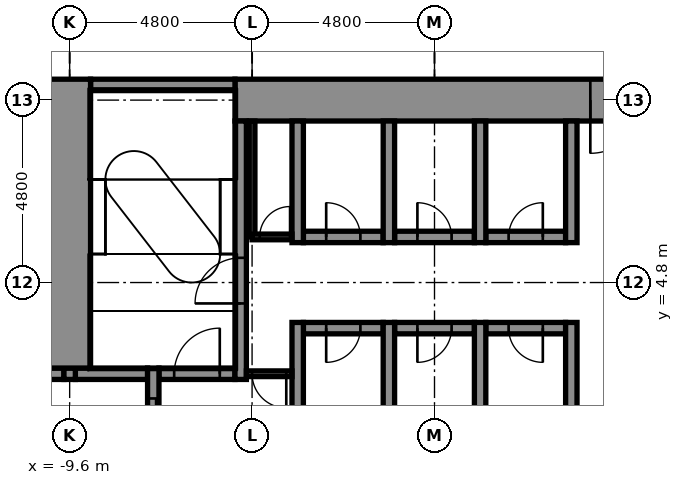
"""IFC4 building model, lengths in metres.
Left out: names, types, materials, properties, quantities, classifications, styles, units other than length and angle.
Written with IfcOpenShell. Run it as: python <this file> out.ifc"""

import sys

from ifc_helpers import new_model, si_unit, direction, frame, frame_2d, origin, place, context, subcontext, project, spatial, rectangle, extrude, element, fill, save


model = new_model("IFC4")
c1 = context("Model", 3, precision=1e-05, world=origin(), true_north=direction((0.0, 1.0)))
c2 = subcontext(c1, "Body", "Model", "MODEL_VIEW")
j1 = project(units=[si_unit("LENGTHUNIT", "METRE"), si_unit("PLANEANGLEUNIT", "RADIAN")], contexts=[c1])
p1 = place(None, origin())
s1 = spatial("IfcSite", under=j1, at=p1, CompositionType="ELEMENT")
p2 = place(p1, origin())
s2 = spatial("IfcBuilding", under=s1, at=p2, CompositionType="ELEMENT")
p3 = place(p2, frame((0.0, 0.0, 66.4)))
s3 = spatial("IfcBuildingStorey", under=s2, at=p3, CompositionType="ELEMENT", Elevation=66.4)
p4 = place(p3, frame((-10.85, 2.4, -0.3), z_axis=(0.0, 0.0, 1.0), x_axis=(1.0, 0.0, 0.0)))
e1 = element("IfcWall", 1, at=p4, inside=s3, PredefinedType="STANDARD", context=c2, shape_type="SweptSolid", body=[
    extrude(rectangle(XDim=1.1, YDim=0.3, at=frame_2d((0.55, 0.0))), origin(), (0.0, 0.0, 1.0), 5.5),
])
p5 = place(p3, frame((-9.45, 2.4, -0.3), z_axis=(0.0, 0.0, 1.0), x_axis=(1.0, 0.0, 0.0)))
e2 = element("IfcWall", 2, at=p5, inside=s3, PredefinedType="STANDARD", context=c2, shape_type="SweptSolid", body=[
    extrude(rectangle(XDim=1.9, YDim=0.3, at=frame_2d((0.95, 0.0))), origin(), (0.0, 0.0, 1.0), 5.5),
])
p6 = place(p3, frame((-7.25, 2.4, -0.3), z_axis=(0.0, 0.0, 1.0), x_axis=(1.0, 0.0, 0.0)))
e3 = element("IfcWall", 3, at=p6, inside=s3, PredefinedType="STANDARD", context=c2, shape_type="SweptSolid", body=[
    extrude(rectangle(XDim=2.0, YDim=0.3, at=frame_2d((1.0, 0.0))), origin(), (0.0, 0.0, 1.0), 5.5),
])
p7 = place(p6, frame((0.4, 0.0, 0.3)))
e4 = element("IfcOpeningElement", 4, at=p7, cuts=e3, PredefinedType="OPENING", context=c2, shape_type="SweptSolid", body=[
    extrude(rectangle(XDim=1.2, YDim=2.1, at=frame_2d((0.6, 1.05))), frame((0.0, 0.16, 0.0), z_axis=(0.0, -1.0, 0.0), x_axis=(1.0, 0.0, 0.0)), (0.0, 0.0, 1.0), 0.32),
])
p8 = place(p3, frame((-3.45, 3.6, -0.3), z_axis=(0.0, 0.0, 1.0), x_axis=(1.0, 0.0, 0.0)))
e5 = element("IfcWall", 5, at=p8, inside=s3, PredefinedType="STANDARD", context=c2, shape_type="SweptSolid", body=[
    extrude(rectangle(XDim=2.1, YDim=0.3, at=frame_2d((1.05, 0.0))), origin(), (0.0, 0.0, 1.0), 5.5),
])
p9 = place(p8, frame((0.6, 0.0, 0.3)))
e6 = element("IfcOpeningElement", 6, at=p9, cuts=e5, PredefinedType="OPENING", context=c2, shape_type="SweptSolid", body=[
    extrude(rectangle(XDim=0.9, YDim=2.1, at=frame_2d((0.45, 1.05))), frame((0.0, 0.16, 0.0), z_axis=(0.0, -1.0, 0.0), x_axis=(1.0, 0.0, 0.0)), (0.0, 0.0, 1.0), 0.32),
])
p10 = place(p3, frame((-1.05, 3.6, -0.3), z_axis=(0.0, 0.0, 1.0), x_axis=(1.0, 0.0, 0.0)))
e7 = element("IfcWall", 7, at=p10, inside=s3, PredefinedType="STANDARD", context=c2, shape_type="SweptSolid", body=[
    extrude(rectangle(XDim=2.1, YDim=0.3, at=frame_2d((1.05, 0.0))), origin(), (0.0, 0.0, 1.0), 5.5),
])
p11 = place(p10, frame((0.6, 0.0, 0.3)))
e8 = element("IfcOpeningElement", 8, at=p11, cuts=e7, PredefinedType="OPENING", context=c2, shape_type="SweptSolid", body=[
    extrude(rectangle(XDim=0.9, YDim=2.1, at=frame_2d((0.45, 1.05))), frame((0.0, 0.16, 0.0), z_axis=(0.0, -1.0, 0.0), x_axis=(1.0, 0.0, 0.0)), (0.0, 0.0, 1.0), 0.32),
])
p12 = place(p3, frame((1.35, 3.6, -0.3), z_axis=(0.0, 0.0, 1.0), x_axis=(1.0, 0.0, 0.0)))
e9 = element("IfcWall", 9, at=p12, inside=s3, PredefinedType="STANDARD", context=c2, shape_type="SweptSolid", body=[
    extrude(rectangle(XDim=2.1, YDim=0.3, at=frame_2d((1.05, 0.0))), origin(), (0.0, 0.0, 1.0), 5.5),
])
p13 = place(p12, frame((0.6, 0.0, 0.3)))
e10 = element("IfcOpeningElement", 10, at=p13, cuts=e9, PredefinedType="OPENING", context=c2, shape_type="SweptSolid", body=[
    extrude(rectangle(XDim=0.9, YDim=2.1, at=frame_2d((0.45, 1.05))), frame((0.0, 0.16, 0.0), z_axis=(0.0, -1.0, 0.0), x_axis=(1.0, 0.0, 0.0)), (0.0, 0.0, 1.0), 0.32),
])
p14 = place(p3, frame((-3.45, 6.0, -0.3), z_axis=(0.0, 0.0, 1.0), x_axis=(1.0, 0.0, 0.0)))
e11 = element("IfcWall", 11, at=p14, inside=s3, PredefinedType="STANDARD", context=c2, shape_type="SweptSolid", body=[
    extrude(rectangle(XDim=2.1, YDim=0.3, at=frame_2d((1.05, 0.0))), origin(), (0.0, 0.0, 1.0), 5.5),
])
p15 = place(p14, frame((0.6, 0.0, 0.3)))
e12 = element("IfcOpeningElement", 12, at=p15, cuts=e11, PredefinedType="OPENING", context=c2, shape_type="SweptSolid", body=[
    extrude(rectangle(XDim=0.9, YDim=2.1, at=frame_2d((0.45, 1.05))), frame((0.0, 0.16, 0.0), z_axis=(0.0, -1.0, 0.0), x_axis=(1.0, 0.0, 0.0)), (0.0, 0.0, 1.0), 0.32),
])
p16 = place(p3, frame((-1.05, 6.0, -0.3), z_axis=(0.0, 0.0, 1.0), x_axis=(1.0, 0.0, 0.0)))
e13 = element("IfcWall", 13, at=p16, inside=s3, PredefinedType="STANDARD", context=c2, shape_type="SweptSolid", body=[
    extrude(rectangle(XDim=2.1, YDim=0.3, at=frame_2d((1.05, 0.0))), origin(), (0.0, 0.0, 1.0), 5.5),
])
p17 = place(p16, frame((0.6, 0.0, 0.3)))
e14 = element("IfcOpeningElement", 14, at=p17, cuts=e13, PredefinedType="OPENING", context=c2, shape_type="SweptSolid", body=[
    extrude(rectangle(XDim=0.9, YDim=2.1, at=frame_2d((0.45, 1.05))), frame((0.0, 0.16, 0.0), z_axis=(0.0, -1.0, 0.0), x_axis=(1.0, 0.0, 0.0)), (0.0, 0.0, 1.0), 0.32),
])
p18 = place(p3, frame((1.35, 6.0, -0.3), z_axis=(0.0, 0.0, 1.0), x_axis=(1.0, 0.0, 0.0)))
e15 = element("IfcWall", 15, at=p18, inside=s3, PredefinedType="STANDARD", context=c2, shape_type="SweptSolid", body=[
    extrude(rectangle(XDim=2.1, YDim=0.3, at=frame_2d((1.05, 0.0))), origin(), (0.0, 0.0, 1.0), 5.5),
])
p19 = place(p18, frame((0.6, 0.0, 0.3)))
e16 = element("IfcOpeningElement", 16, at=p19, cuts=e15, PredefinedType="OPENING", context=c2, shape_type="SweptSolid", body=[
    extrude(rectangle(XDim=0.9, YDim=2.1, at=frame_2d((0.45, 1.05))), frame((0.0, 0.16, 0.0), z_axis=(0.0, -1.0, 0.0), x_axis=(1.0, 0.0, 0.0)), (0.0, 0.0, 1.0), 0.32),
])
p20 = place(p3, frame((-5.25, 9.6, -0.3), z_axis=(0.0, 0.0, 1.0), x_axis=(1.0, 0.0, 0.0)))
e17 = element("IfcWall", 17, at=p20, inside=s3, PredefinedType="SHEAR", context=c2, shape_type="SweptSolid", body=[
    extrude(rectangle(XDim=14.3, YDim=1.1, at=frame_2d((7.15, 0.0))), origin(), (0.0, 0.0, 1.0), 5.5),
])
p21 = place(p20, frame((9.35, 0.0, 0.3)))
e18 = element("IfcOpeningElement", 18, at=p21, cuts=e17, PredefinedType="OPENING", context=c2, shape_type="SweptSolid", body=[
    extrude(rectangle(XDim=1.4, YDim=2.1, at=frame_2d((0.7, 1.05))), frame((0.0, 0.56, 0.0), z_axis=(0.0, -1.0, 0.0), x_axis=(1.0, 0.0, 0.0)), (0.0, 0.0, 1.0), 1.12),
])
p22 = place(p3, frame((-9.05, 10.0, -0.3), z_axis=(0.0, 0.0, 1.0), x_axis=(1.0, 0.0, 0.0)))
e19 = element("IfcWall", 19, at=p22, inside=s3, PredefinedType="STANDARD", context=c2, shape_type="SweptSolid", body=[
    extrude(rectangle(XDim=3.8, YDim=0.3, at=frame_2d((1.9, 0.0))), origin(), (0.0, 0.0, 1.0), 5.5),
])
p23 = place(p3, frame((-9.6, 2.25, -0.3), z_axis=(0.0, 0.0, 1.0), x_axis=(0.0, 1.0, 0.0)))
e20 = element("IfcWall", 20, at=p23, inside=s3, PredefinedType="STANDARD", context=c2, shape_type="SweptSolid", body=[
    extrude(rectangle(XDim=0.3, YDim=0.3, at=frame_2d((0.15, 0.0))), origin(), (0.0, 0.0, 1.0), 5.5),
])
p24 = place(p3, frame((-9.6, 2.55, -0.3), z_axis=(0.0, 0.0, 1.0), x_axis=(0.0, 1.0, 0.0)))
e21 = element("IfcWall", 21, at=p24, inside=s3, PredefinedType="SHEAR", context=c2, shape_type="SweptSolid", body=[
    extrude(rectangle(XDim=7.6, YDim=1.1, at=frame_2d((3.8, 0.0))), origin(), (0.0, 0.0, 1.0), 5.5),
])
p25 = place(p3, frame((-7.4, -2.55, -0.3), z_axis=(0.0, 0.0, 1.0), x_axis=(0.0, 1.0, 0.0)))
e22 = element("IfcWall", 22, at=p25, inside=s3, PredefinedType="STANDARD", context=c2, shape_type="SweptSolid", body=[
    extrude(rectangle(XDim=5.1, YDim=0.3, at=frame_2d((2.55, 0.0))), origin(), (0.0, 0.0, 1.0), 5.5),
])
p26 = place(p25, frame((0.8, 0.0, 0.3)))
e23 = element("IfcOpeningElement", 23, at=p26, cuts=e22, PredefinedType="OPENING", context=c2, shape_type="SweptSolid", body=[
    extrude(rectangle(XDim=1.1, YDim=2.1, at=frame_2d((0.55, 1.05))), frame((0.0, 0.16, 0.0), z_axis=(0.0, -1.0, 0.0), x_axis=(1.0, 0.0, 0.0)), (0.0, 0.0, 1.0), 0.32),
])
p27 = place(p25, frame((3.2, 0.0, 0.3)))
e24 = element("IfcOpeningElement", 24, at=p27, cuts=e22, PredefinedType="OPENING", context=c2, shape_type="SweptSolid", body=[
    extrude(rectangle(XDim=1.1, YDim=2.1, at=frame_2d((0.55, 1.05))), frame((0.0, 0.16, 0.0), z_axis=(0.0, -1.0, 0.0), x_axis=(1.0, 0.0, 0.0)), (0.0, 0.0, 1.0), 0.32),
])
p28 = place(p3, frame((-5.1, 2.25, -0.3), z_axis=(0.0, 0.0, 1.0), x_axis=(0.0, 1.0, 0.0)))
e25 = element("IfcWall", 25, at=p28, inside=s3, PredefinedType="STANDARD", context=c2, shape_type="SweptSolid", body=[
    extrude(rectangle(XDim=6.8, YDim=0.3, at=frame_2d((3.4, 0.0))), origin(), (0.0, 0.0, 1.0), 5.5),
])
p29 = place(p28, frame((2.0, 0.0, 0.3)))
e26 = element("IfcOpeningElement", 26, at=p29, cuts=e25, PredefinedType="OPENING", context=c2, shape_type="SweptSolid", body=[
    extrude(rectangle(XDim=1.2, YDim=2.1, at=frame_2d((0.6, 1.05))), frame((0.0, 0.16, 0.0), z_axis=(0.0, -1.0, 0.0), x_axis=(1.0, 0.0, 0.0)), (0.0, 0.0, 1.0), 0.32),
])
p30 = place(p3, frame((-3.6, -3.75, -0.3), z_axis=(0.0, 0.0, 1.0), x_axis=(0.0, 1.0, 0.0)))
e27 = element("IfcWall", 27, at=p30, inside=s3, PredefinedType="STANDARD", context=c2, shape_type="SweptSolid", body=[
    extrude(rectangle(XDim=7.5, YDim=0.3, at=frame_2d((3.75, 0.0))), origin(), (0.0, 0.0, 1.0), 5.5),
])
p31 = place(p3, frame((-3.6, 5.85, -0.3), z_axis=(0.0, 0.0, 1.0), x_axis=(0.0, 1.0, 0.0)))
e28 = element("IfcWall", 28, at=p31, inside=s3, PredefinedType="STANDARD", context=c2, shape_type="SweptSolid", body=[
    extrude(rectangle(XDim=3.2, YDim=0.3, at=frame_2d((1.6, 0.0))), origin(), (0.0, 0.0, 1.0), 5.5),
])
p32 = place(p3, frame((-1.2, -3.75, -0.3), z_axis=(0.0, 0.0, 1.0), x_axis=(0.0, 1.0, 0.0)))
e29 = element("IfcWall", 29, at=p32, inside=s3, PredefinedType="STANDARD", context=c2, shape_type="SweptSolid", body=[
    extrude(rectangle(XDim=7.5, YDim=0.3, at=frame_2d((3.75, 0.0))), origin(), (0.0, 0.0, 1.0), 5.5),
])
p33 = place(p3, frame((-1.2, 5.85, -0.3), z_axis=(0.0, 0.0, 1.0), x_axis=(0.0, 1.0, 0.0)))
e30 = element("IfcWall", 30, at=p33, inside=s3, PredefinedType="STANDARD", context=c2, shape_type="SweptSolid", body=[
    extrude(rectangle(XDim=3.2, YDim=0.3, at=frame_2d((1.6, 0.0))), origin(), (0.0, 0.0, 1.0), 5.5),
])
p34 = place(p3, frame((1.2, -3.75, -0.3), z_axis=(0.0, 0.0, 1.0), x_axis=(0.0, 1.0, 0.0)))
e31 = element("IfcWall", 31, at=p34, inside=s3, PredefinedType="STANDARD", context=c2, shape_type="SweptSolid", body=[
    extrude(rectangle(XDim=7.5, YDim=0.3, at=frame_2d((3.75, 0.0))), origin(), (0.0, 0.0, 1.0), 5.5),
])
p35 = place(p3, frame((1.2, 5.85, -0.3), z_axis=(0.0, 0.0, 1.0), x_axis=(0.0, 1.0, 0.0)))
e32 = element("IfcWall", 32, at=p35, inside=s3, PredefinedType="STANDARD", context=c2, shape_type="SweptSolid", body=[
    extrude(rectangle(XDim=3.2, YDim=0.3, at=frame_2d((1.6, 0.0))), origin(), (0.0, 0.0, 1.0), 5.5),
])
p36 = place(p3, frame((3.6, -3.75, -0.3), z_axis=(0.0, 0.0, 1.0), x_axis=(0.0, 1.0, 0.0)))
e33 = element("IfcWall", 33, at=p36, inside=s3, PredefinedType="STANDARD", context=c2, shape_type="SweptSolid", body=[
    extrude(rectangle(XDim=7.5, YDim=0.3, at=frame_2d((3.75, 0.0))), origin(), (0.0, 0.0, 1.0), 5.5),
])
p37 = place(p3, frame((3.6, 5.85, -0.3), z_axis=(0.0, 0.0, 1.0), x_axis=(0.0, 1.0, 0.0)))
e34 = element("IfcWall", 34, at=p37, inside=s3, PredefinedType="STANDARD", context=c2, shape_type="SweptSolid", body=[
    extrude(rectangle(XDim=3.2, YDim=0.3, at=frame_2d((1.6, 0.0))), origin(), (0.0, 0.0, 1.0), 5.5),
])
p38 = place(p3, frame((-4.8, 6.0, 0.0), z_axis=(0.0, 0.0, 1.0), x_axis=(0.0, 1.0, 0.0)))
e35 = element("IfcWall", 35, at=p38, inside=s3, PredefinedType="PARTITIONING", context=c2, shape_type="SweptSolid", body=[
    extrude(rectangle(XDim=3.05, YDim=0.15, at=frame_2d((1.525, 0.0))), origin(), (0.0, 0.0, 1.0), 5.2),
])
p39 = place(p3, frame((-4.8, 6.0, 0.0), z_axis=(0.0, 0.0, 1.0), x_axis=(1.0, 0.0, 0.0)))
e36 = element("IfcWall", 36, at=p39, inside=s3, PredefinedType="PARTITIONING", context=c2, shape_type="SweptSolid", body=[
    extrude(rectangle(XDim=1.05, YDim=0.15, at=frame_2d((0.525, 0.0))), origin(), (0.0, 0.0, 1.0), 5.2),
])
p40 = place(p39, frame((0.2, 0.0, 0.0)))
e37 = element("IfcOpeningElement", 37, at=p40, cuts=e36, PredefinedType="OPENING", context=c2, shape_type="SweptSolid", body=[
    extrude(rectangle(XDim=0.8, YDim=2.1, at=frame_2d((0.4, 1.05))), frame((0.0, 0.085, 0.0), z_axis=(0.0, -1.0, 0.0), x_axis=(1.0, 0.0, 0.0)), (0.0, 0.0, 1.0), 0.17),
])
p41 = place(p3, frame((-4.95, 2.4, 0.0), z_axis=(0.0, 0.0, 1.0), x_axis=(1.0, 0.0, 0.0)))
e38 = element("IfcWall", 38, at=p41, inside=s3, PredefinedType="PARTITIONING", context=c2, shape_type="SweptSolid", body=[
    extrude(rectangle(XDim=1.2, YDim=0.15, at=frame_2d((0.6, 0.0))), origin(), (0.0, 0.0, 1.0), 5.2),
])
p42 = place(p41, frame((0.15, 0.0, 0.0)))
e39 = element("IfcOpeningElement", 39, at=p42, cuts=e38, PredefinedType="OPENING", context=c2, shape_type="SweptSolid", body=[
    extrude(rectangle(XDim=0.9, YDim=2.1, at=frame_2d((0.45, 1.05))), frame((0.0, 0.085, 0.0), z_axis=(0.0, -1.0, 0.0), x_axis=(1.0, 0.0, 0.0)), (0.0, 0.0, 1.0), 0.17),
])
p43 = place(p40, origin())
e40 = element("IfcDoor", 40, at=p43, inside=s3, OperationType="SINGLE_SWING_RIGHT", PredefinedType="DOOR", context=c2, shape_type="SweptSolid", body=[
    extrude(rectangle(XDim=0.8, YDim=2.1, at=frame_2d((0.4, 1.05))), frame((0.0, 0.025, 0.0), z_axis=(0.0, -1.0, 0.0), x_axis=(1.0, 0.0, 0.0)), (0.0, 0.0, 1.0), 0.05),
])
fill(e37, e40)
p44 = place(p27, origin())
e41 = element("IfcDoor", 41, at=p44, inside=s3, OperationType="DOUBLE_DOOR_SLIDING", PredefinedType="DOOR", context=c2, shape_type="SweptSolid", body=[
    extrude(rectangle(XDim=1.1, YDim=2.1, at=frame_2d((0.55, 1.05))), frame((0.0, 0.025, 0.0), z_axis=(0.0, -1.0, 0.0), x_axis=(1.0, 0.0, 0.0)), (0.0, 0.0, 1.0), 0.05),
])
fill(e24, e41)
p45 = place(p29, origin())
e42 = element("IfcDoor", 42, at=p45, inside=s3, OperationType="SINGLE_SWING_LEFT", PredefinedType="DOOR", context=c2, shape_type="SweptSolid", body=[
    extrude(rectangle(XDim=1.2, YDim=2.1, at=frame_2d((0.6, 1.05))), frame((0.0, 0.025, 0.0), z_axis=(0.0, -1.0, 0.0), x_axis=(1.0, 0.0, 0.0)), (0.0, 0.0, 1.0), 0.05),
])
fill(e26, e42)
p46 = place(p15, origin())
e43 = element("IfcDoor", 43, at=p46, inside=s3, OperationType="SINGLE_SWING_LEFT", PredefinedType="DOOR", context=c2, shape_type="SweptSolid", body=[
    extrude(rectangle(XDim=0.9, YDim=2.1, at=frame_2d((0.45, 1.05))), frame((0.0, 0.025, 0.0), z_axis=(0.0, -1.0, 0.0), x_axis=(1.0, 0.0, 0.0)), (0.0, 0.0, 1.0), 0.05),
])
fill(e12, e43)
p47 = place(p17, origin())
e44 = element("IfcDoor", 44, at=p47, inside=s3, OperationType="SINGLE_SWING_LEFT", PredefinedType="DOOR", context=c2, shape_type="SweptSolid", body=[
    extrude(rectangle(XDim=0.9, YDim=2.1, at=frame_2d((0.45, 1.05))), frame((0.0, 0.025, 0.0), z_axis=(0.0, -1.0, 0.0), x_axis=(1.0, 0.0, 0.0)), (0.0, 0.0, 1.0), 0.05),
])
fill(e14, e44)
p48 = place(p19, origin())
e45 = element("IfcDoor", 45, at=p48, inside=s3, OperationType="SINGLE_SWING_RIGHT", PredefinedType="DOOR", context=c2, shape_type="SweptSolid", body=[
    extrude(rectangle(XDim=0.9, YDim=2.1, at=frame_2d((0.45, 1.05))), frame((0.0, 0.025, 0.0), z_axis=(0.0, -1.0, 0.0), x_axis=(1.0, 0.0, 0.0)), (0.0, 0.0, 1.0), 0.05),
])
fill(e16, e45)
p49 = place(p9, frame((0.9, 0.0, 0.0), z_axis=(0.0, 0.0, 1.0), x_axis=(-1.0, 0.0, 0.0)))
e46 = element("IfcDoor", 46, at=p49, inside=s3, OperationType="SINGLE_SWING_LEFT", PredefinedType="DOOR", context=c2, shape_type="SweptSolid", body=[
    extrude(rectangle(XDim=0.9, YDim=2.1, at=frame_2d((0.45, 1.05))), frame((0.0, 0.025, 0.0), z_axis=(0.0, -1.0, 0.0), x_axis=(1.0, 0.0, 0.0)), (0.0, 0.0, 1.0), 0.05),
])
fill(e6, e46)
p50 = place(p11, frame((0.9, 0.0, 0.0), z_axis=(0.0, 0.0, 1.0), x_axis=(-1.0, 0.0, 0.0)))
e47 = element("IfcDoor", 47, at=p50, inside=s3, OperationType="SINGLE_SWING_LEFT", PredefinedType="DOOR", context=c2, shape_type="SweptSolid", body=[
    extrude(rectangle(XDim=0.9, YDim=2.1, at=frame_2d((0.45, 1.05))), frame((0.0, 0.025, 0.0), z_axis=(0.0, -1.0, 0.0), x_axis=(1.0, 0.0, 0.0)), (0.0, 0.0, 1.0), 0.05),
])
fill(e8, e47)
p51 = place(p13, frame((0.9, 0.0, 0.0), z_axis=(0.0, 0.0, 1.0), x_axis=(-1.0, 0.0, 0.0)))
e48 = element("IfcDoor", 48, at=p51, inside=s3, OperationType="SINGLE_SWING_RIGHT", PredefinedType="DOOR", context=c2, shape_type="SweptSolid", body=[
    extrude(rectangle(XDim=0.9, YDim=2.1, at=frame_2d((0.45, 1.05))), frame((0.0, 0.025, 0.0), z_axis=(0.0, -1.0, 0.0), x_axis=(1.0, 0.0, 0.0)), (0.0, 0.0, 1.0), 0.05),
])
fill(e10, e48)
p52 = place(p21, frame((1.4, 0.0, 0.0), z_axis=(0.0, 0.0, 1.0), x_axis=(-1.0, 0.0, 0.0)))
e49 = element("IfcDoor", 49, at=p52, inside=s3, OperationType="SINGLE_SWING_LEFT", PredefinedType="DOOR", context=c2, shape_type="SweptSolid", body=[
    extrude(rectangle(XDim=1.4, YDim=2.1, at=frame_2d((0.7, 1.05))), frame((0.0, 0.025, 0.0), z_axis=(0.0, -1.0, 0.0), x_axis=(1.0, 0.0, 0.0)), (0.0, 0.0, 1.0), 0.05),
])
fill(e18, e49)
p53 = place(p42, frame((0.9, 0.0, 0.0), z_axis=(0.0, 0.0, 1.0), x_axis=(-1.0, 0.0, 0.0)))
e50 = element("IfcDoor", 50, at=p53, inside=s3, OperationType="SINGLE_SWING_RIGHT", PredefinedType="DOOR", context=c2, shape_type="SweptSolid", body=[
    extrude(rectangle(XDim=0.9, YDim=2.1, at=frame_2d((0.45, 1.05))), frame((0.0, 0.025, 0.0), z_axis=(0.0, -1.0, 0.0), x_axis=(1.0, 0.0, 0.0)), (0.0, 0.0, 1.0), 0.05),
])
fill(e39, e50)
p54 = place(p7, origin())
e51 = element("IfcDoor", 51, at=p54, inside=s3, OperationType="SINGLE_SWING_RIGHT", PredefinedType="DOOR", context=c2, shape_type="SweptSolid", body=[
    extrude(rectangle(XDim=1.2, YDim=2.1, at=frame_2d((0.6, 1.05))), frame((0.0, 0.025, 0.0), z_axis=(0.0, -1.0, 0.0), x_axis=(1.0, 0.0, 0.0)), (0.0, 0.0, 1.0), 0.05),
])
fill(e4, e51)
save(model, sys.argv[1])
